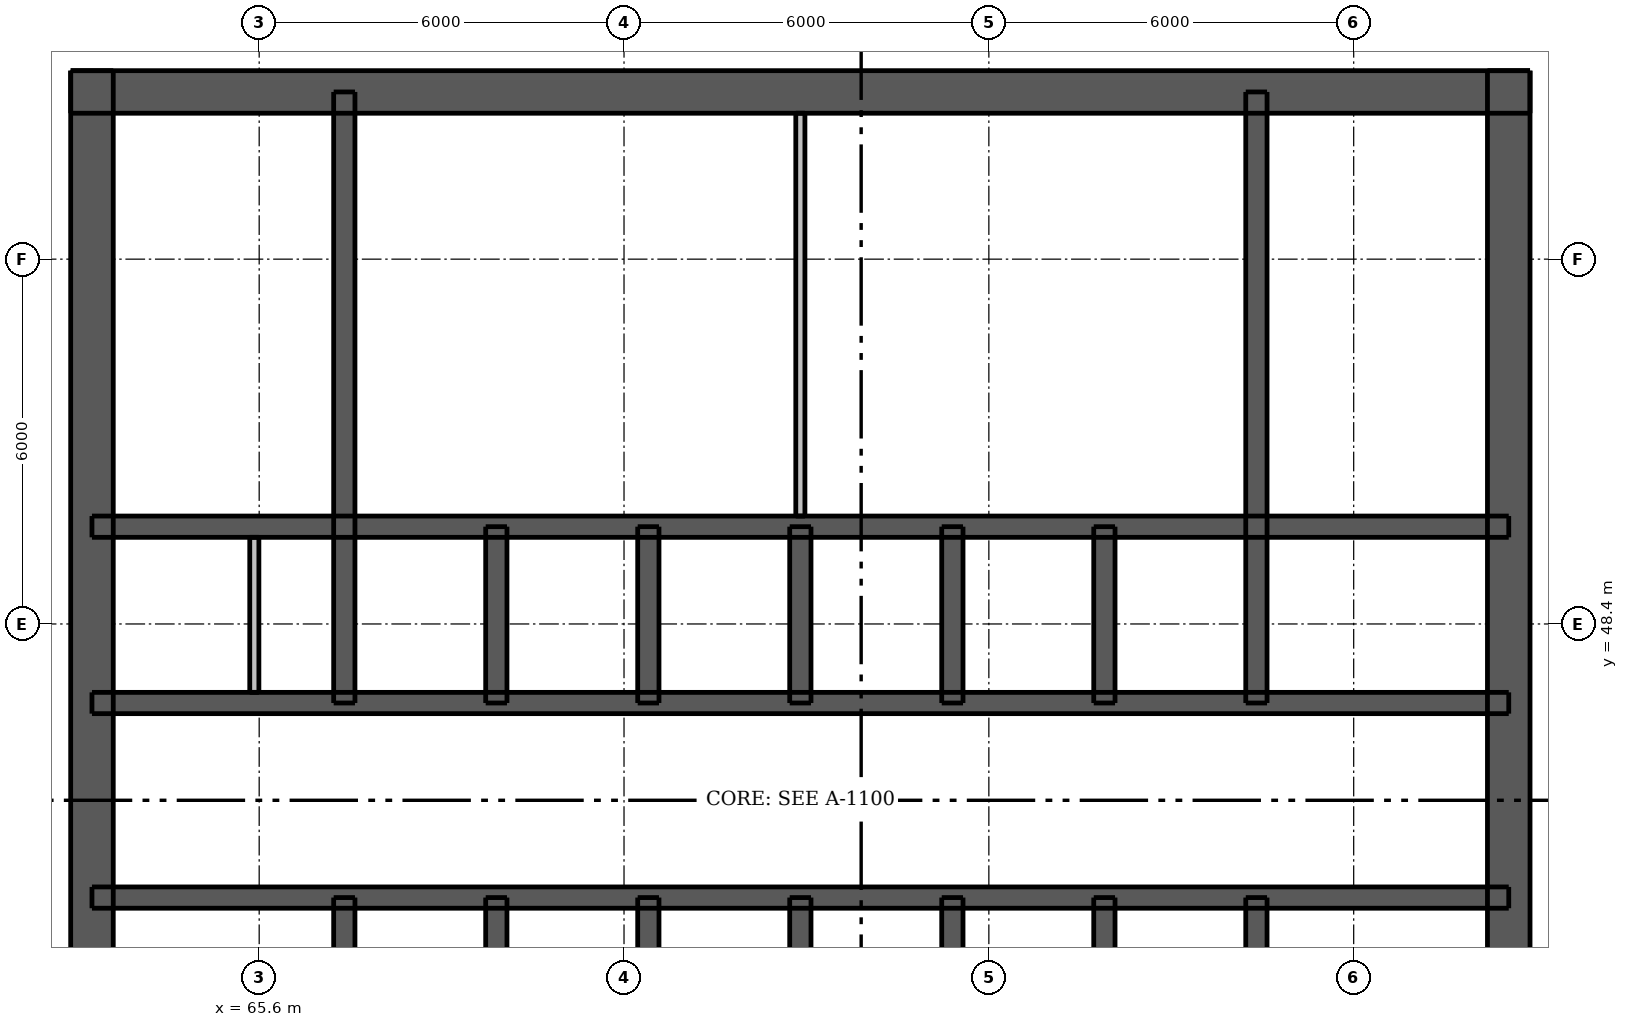
"""IFC4 building model, lengths in metres.
Left out: names, types, materials, properties, quantities, classifications, styles, units other than length and angle.
Written with IfcOpenShell. Run it as: python <this file> out.ifc"""

import sys

from ifc_helpers import new_model, si_unit, direction, frame, frame_2d, origin, place, context, subcontext, project, spatial, rectangle, extrude, element, fill, save


model = new_model("IFC4")
c1 = context("Model", 3, precision=1e-05, world=origin(), true_north=direction((0.0, 1.0)))
c2 = subcontext(c1, "Body", "Model", "MODEL_VIEW")
j1 = project(units=[si_unit("LENGTHUNIT", "METRE"), si_unit("PLANEANGLEUNIT", "RADIAN")], contexts=[c1])
p1 = place(None, origin())
s1 = spatial("IfcSite", under=j1, at=p1, CompositionType="ELEMENT")
p2 = place(p1, origin())
s2 = spatial("IfcBuilding", under=s1, at=p2, CompositionType="ELEMENT")
p3 = place(p2, frame((0.0, 0.0, 143.8)))
s3 = spatial("IfcBuildingStorey", under=s2, at=p3, CompositionType="ELEMENT", Elevation=143.8)
p4 = place(p3, frame((62.5, 57.15, 0.0), z_axis=(0.0, 0.0, 1.0), x_axis=(1.0, 0.0, 0.0)))
e1 = element("IfcWall", 1, at=p4, inside=s3, PredefinedType="SHEAR", context=c2, shape_type="SweptSolid", body=[
    extrude(rectangle(XDim=24.0, YDim=0.7, at=frame_2d((12.0, 0.0))), origin(), (0.0, 0.0, 1.0), 3.05),
])
p5 = place(p4, frame((20.938, 0.0, 0.0)))
e2 = element("IfcOpeningElement", 2, at=p5, cuts=e1, PredefinedType="OPENING", context=c2, shape_type="SweptSolid", body=[
    extrude(rectangle(XDim=1.1, YDim=2.1, at=frame_2d((0.55, 1.05))), frame((0.0, 0.36, 0.0), z_axis=(0.0, -1.0, 0.0), x_axis=(1.0, 0.0, 0.0)), (0.0, 0.0, 1.0), 0.72),
])
p6 = place(p4, frame((1.962, 0.0, 0.0)))
e3 = element("IfcOpeningElement", 3, at=p6, cuts=e1, PredefinedType="OPENING", context=c2, shape_type="SweptSolid", body=[
    extrude(rectangle(XDim=1.1, YDim=2.1, at=frame_2d((0.55, 1.05))), frame((0.0, 0.36, 0.0), z_axis=(0.0, -1.0, 0.0), x_axis=(1.0, 0.0, 0.0)), (0.0, 0.0, 1.0), 0.72),
])
p7 = place(p4, frame((7.887, 0.0, 0.0)))
e4 = element("IfcOpeningElement", 4, at=p7, cuts=e1, PredefinedType="OPENING", context=c2, shape_type="SweptSolid", body=[
    extrude(rectangle(XDim=0.9, YDim=2.1, at=frame_2d((0.45, 1.05))), frame((0.0, 0.36, 0.0), z_axis=(0.0, -1.0, 0.0), x_axis=(1.0, 0.0, 0.0)), (0.0, 0.0, 1.0), 0.72),
])
p8 = place(p4, frame((15.212, 0.0, 0.0)))
e5 = element("IfcOpeningElement", 5, at=p8, cuts=e1, PredefinedType="OPENING", context=c2, shape_type="SweptSolid", body=[
    extrude(rectangle(XDim=0.9, YDim=2.1, at=frame_2d((0.45, 1.05))), frame((0.0, 0.36, 0.0), z_axis=(0.0, -1.0, 0.0), x_axis=(1.0, 0.0, 0.0)), (0.0, 0.0, 1.0), 0.72),
])
p9 = place(p3, frame((62.85, 33.5, 0.0), z_axis=(0.0, 0.0, 1.0), x_axis=(0.0, 1.0, 0.0)))
e6 = element("IfcWall", 6, at=p9, inside=s3, PredefinedType="SHEAR", context=c2, shape_type="SweptSolid", body=[
    extrude(rectangle(XDim=24.0, YDim=0.7, at=frame_2d((12.0, 0.0))), origin(), (0.0, 0.0, 1.0), 3.05),
])
p10 = place(p9, frame((11.2, 0.0, 0.0)))
e7 = element("IfcOpeningElement", 7, at=p10, cuts=e6, PredefinedType="OPENING", context=c2, shape_type="SweptSolid", body=[
    extrude(rectangle(XDim=1.6, YDim=2.1, at=frame_2d((0.8, 1.05))), frame((0.0, 0.36, 0.0), z_axis=(0.0, -1.0, 0.0), x_axis=(1.0, 0.0, 0.0)), (0.0, 0.0, 1.0), 0.72),
])
p11 = place(p3, frame((86.15, 33.5, 0.0), z_axis=(0.0, 0.0, 1.0), x_axis=(0.0, 1.0, 0.0)))
e8 = element("IfcWall", 8, at=p11, inside=s3, PredefinedType="SHEAR", context=c2, shape_type="SweptSolid", body=[
    extrude(rectangle(XDim=24.0, YDim=0.7, at=frame_2d((12.0, 0.0))), origin(), (0.0, 0.0, 1.0), 3.05),
])
p12 = place(p11, frame((11.2, 0.0, 0.0)))
e9 = element("IfcOpeningElement", 9, at=p12, cuts=e8, PredefinedType="OPENING", context=c2, shape_type="SweptSolid", body=[
    extrude(rectangle(XDim=1.6, YDim=2.1, at=frame_2d((0.8, 1.05))), frame((0.0, 0.36, 0.0), z_axis=(0.0, -1.0, 0.0), x_axis=(1.0, 0.0, 0.0)), (0.0, 0.0, 1.0), 0.72),
])
p13 = place(p3, frame((62.85, 43.9, 0.0), z_axis=(0.0, 0.0, 1.0), x_axis=(1.0, 0.0, 0.0)))
e10 = element("IfcWall", 10, at=p13, inside=s3, PredefinedType="SHEAR", context=c2, shape_type="SweptSolid", body=[
    extrude(rectangle(XDim=23.3, YDim=0.35, at=frame_2d((11.65, 0.0))), origin(), (0.0, 0.0, 1.0), 3.05),
])
p14 = place(p13, frame((1.712, 0.0, 0.0)))
e11 = element("IfcOpeningElement", 11, at=p14, cuts=e10, PredefinedType="OPENING", context=c2, shape_type="SweptSolid", body=[
    extrude(rectangle(XDim=0.9, YDim=2.1, at=frame_2d((0.45, 1.05))), frame((0.0, 0.185, 0.0), z_axis=(0.0, -1.0, 0.0), x_axis=(1.0, 0.0, 0.0)), (0.0, 0.0, 1.0), 0.37),
])
p15 = place(p13, frame((20.688, 0.0, 0.0)))
e12 = element("IfcOpeningElement", 12, at=p15, cuts=e10, PredefinedType="OPENING", context=c2, shape_type="SweptSolid", body=[
    extrude(rectangle(XDim=0.9, YDim=2.1, at=frame_2d((0.45, 1.05))), frame((0.0, 0.185, 0.0), z_axis=(0.0, -1.0, 0.0), x_axis=(1.0, 0.0, 0.0)), (0.0, 0.0, 1.0), 0.37),
])
p16 = place(p13, frame((4.85, 0.0, 0.0)))
e13 = element("IfcOpeningElement", 13, at=p16, cuts=e10, PredefinedType="OPENING", context=c2, shape_type="SweptSolid", body=[
    extrude(rectangle(XDim=1.1, YDim=2.1, at=frame_2d((0.55, 1.05))), frame((0.0, 0.185, 0.0), z_axis=(0.0, -1.0, 0.0), x_axis=(1.0, 0.0, 0.0)), (0.0, 0.0, 1.0), 0.37),
])
p17 = place(p13, frame((7.35, 0.0, 0.0)))
e14 = element("IfcOpeningElement", 14, at=p17, cuts=e10, PredefinedType="OPENING", context=c2, shape_type="SweptSolid", body=[
    extrude(rectangle(XDim=1.1, YDim=2.1, at=frame_2d((0.55, 1.05))), frame((0.0, 0.185, 0.0), z_axis=(0.0, -1.0, 0.0), x_axis=(1.0, 0.0, 0.0)), (0.0, 0.0, 1.0), 0.37),
])
p18 = place(p13, frame((9.85, 0.0, 0.0)))
e15 = element("IfcOpeningElement", 15, at=p18, cuts=e10, PredefinedType="OPENING", context=c2, shape_type="SweptSolid", body=[
    extrude(rectangle(XDim=1.1, YDim=2.1, at=frame_2d((0.55, 1.05))), frame((0.0, 0.185, 0.0), z_axis=(0.0, -1.0, 0.0), x_axis=(1.0, 0.0, 0.0)), (0.0, 0.0, 1.0), 0.37),
])
p19 = place(p13, frame((12.35, 0.0, 0.0)))
e16 = element("IfcOpeningElement", 16, at=p19, cuts=e10, PredefinedType="OPENING", context=c2, shape_type="SweptSolid", body=[
    extrude(rectangle(XDim=1.1, YDim=2.1, at=frame_2d((0.55, 1.05))), frame((0.0, 0.185, 0.0), z_axis=(0.0, -1.0, 0.0), x_axis=(1.0, 0.0, 0.0)), (0.0, 0.0, 1.0), 0.37),
])
p20 = place(p13, frame((14.85, 0.0, 0.0)))
e17 = element("IfcOpeningElement", 17, at=p20, cuts=e10, PredefinedType="OPENING", context=c2, shape_type="SweptSolid", body=[
    extrude(rectangle(XDim=1.1, YDim=2.1, at=frame_2d((0.55, 1.05))), frame((0.0, 0.185, 0.0), z_axis=(0.0, -1.0, 0.0), x_axis=(1.0, 0.0, 0.0)), (0.0, 0.0, 1.0), 0.37),
])
p21 = place(p13, frame((17.35, 0.0, 0.0)))
e18 = element("IfcOpeningElement", 18, at=p21, cuts=e10, PredefinedType="OPENING", context=c2, shape_type="SweptSolid", body=[
    extrude(rectangle(XDim=1.1, YDim=2.1, at=frame_2d((0.55, 1.05))), frame((0.0, 0.185, 0.0), z_axis=(0.0, -1.0, 0.0), x_axis=(1.0, 0.0, 0.0)), (0.0, 0.0, 1.0), 0.37),
])
p22 = place(p3, frame((62.85, 47.1, 0.0), z_axis=(0.0, 0.0, 1.0), x_axis=(1.0, 0.0, 0.0)))
e19 = element("IfcWall", 19, at=p22, inside=s3, PredefinedType="SHEAR", context=c2, shape_type="SweptSolid", body=[
    extrude(rectangle(XDim=23.3, YDim=0.35, at=frame_2d((11.65, 0.0))), origin(), (0.0, 0.0, 1.0), 3.05),
])
p23 = place(p22, frame((1.06, 0.0, 0.0)))
e20 = element("IfcOpeningElement", 20, at=p23, cuts=e19, PredefinedType="OPENING", context=c2, shape_type="SweptSolid", body=[
    extrude(rectangle(XDim=0.9, YDim=2.1, at=frame_2d((0.45, 1.05))), frame((0.0, 0.185, 0.0), z_axis=(0.0, -1.0, 0.0), x_axis=(1.0, 0.0, 0.0)), (0.0, 0.0, 1.0), 0.37),
])
p24 = place(p22, frame((2.923, 0.0, 0.0)))
e21 = element("IfcOpeningElement", 21, at=p24, cuts=e19, PredefinedType="OPENING", context=c2, shape_type="SweptSolid", body=[
    extrude(rectangle(XDim=0.8, YDim=2.1, at=frame_2d((0.4, 1.05))), frame((0.0, 0.185, 0.0), z_axis=(0.0, -1.0, 0.0), x_axis=(1.0, 0.0, 0.0)), (0.0, 0.0, 1.0), 0.37),
])
p25 = place(p22, frame((20.688, 0.0, 0.0)))
e22 = element("IfcOpeningElement", 22, at=p25, cuts=e19, PredefinedType="OPENING", context=c2, shape_type="SweptSolid", body=[
    extrude(rectangle(XDim=0.9, YDim=2.1, at=frame_2d((0.45, 1.05))), frame((0.0, 0.185, 0.0), z_axis=(0.0, -1.0, 0.0), x_axis=(1.0, 0.0, 0.0)), (0.0, 0.0, 1.0), 0.37),
])
p26 = place(p3, frame((62.85, 50.0, 0.0), z_axis=(0.0, 0.0, 1.0), x_axis=(1.0, 0.0, 0.0)))
e23 = element("IfcWall", 23, at=p26, inside=s3, PredefinedType="SHEAR", context=c2, shape_type="SweptSolid", body=[
    extrude(rectangle(XDim=23.3, YDim=0.35, at=frame_2d((11.65, 0.0))), origin(), (0.0, 0.0, 1.0), 3.05),
])
p27 = place(p3, frame((67.0, 33.85, 0.0), z_axis=(0.0, 0.0, 1.0), x_axis=(0.0, 1.0, 0.0)))
e24 = element("IfcWall", 24, at=p27, inside=s3, PredefinedType="SHEAR", context=c2, shape_type="SweptSolid", body=[
    extrude(rectangle(XDim=10.05, YDim=0.35, at=frame_2d((5.025, 0.0))), origin(), (0.0, 0.0, 1.0), 3.05),
])
p28 = place(p27, frame((0.55, 0.0, 0.0)))
e25 = element("IfcOpeningElement", 25, at=p28, cuts=e24, PredefinedType="OPENING", context=c2, shape_type="SweptSolid", body=[
    extrude(rectangle(XDim=1.1, YDim=2.1, at=frame_2d((0.55, 1.05))), frame((0.0, 0.185, 0.0), z_axis=(0.0, -1.0, 0.0), x_axis=(1.0, 0.0, 0.0)), (0.0, 0.0, 1.0), 0.37),
])
for number, where, z_axis, x_axis in (
    (26, (67.0, 47.1, 0.0), (0.0, 0.0, 1.0), (0.0, 1.0, 0.0)),
    (27, (82.0, 33.85, 0.0), (0.0, 0.0, 1.0), (0.0, 1.0, 0.0)),
    (28, (82.0, 47.1, 0.0), (0.0, 0.0, 1.0), (0.0, 1.0, 0.0)),
):
    element("IfcWall", number, at=place(p3, frame(where, z_axis=z_axis, x_axis=x_axis)), inside=s3, PredefinedType="SHEAR", context=c2, shape_type="SweptSolid", body=[
        extrude(rectangle(XDim=10.05, YDim=0.35, at=frame_2d((5.025, 0.0))), origin(), (0.0, 0.0, 1.0), 3.05),
    ])
for number, where, z_axis, x_axis in (
    (29, (69.5, 41.0, 0.0), (0.0, 0.0, 1.0), (0.0, 1.0, 0.0)),
    (30, (69.5, 47.1, 0.0), (0.0, 0.0, 1.0), (0.0, 1.0, 0.0)),
    (31, (72.0, 41.0, 0.0), (0.0, 0.0, 1.0), (0.0, 1.0, 0.0)),
    (32, (72.0, 47.1, 0.0), (0.0, 0.0, 1.0), (0.0, 1.0, 0.0)),
    (33, (74.5, 41.0, 0.0), (0.0, 0.0, 1.0), (0.0, 1.0, 0.0)),
    (34, (74.5, 47.1, 0.0), (0.0, 0.0, 1.0), (0.0, 1.0, 0.0)),
    (35, (77.0, 41.0, 0.0), (0.0, 0.0, 1.0), (0.0, 1.0, 0.0)),
    (36, (77.0, 47.1, 0.0), (0.0, 0.0, 1.0), (0.0, 1.0, 0.0)),
    (37, (79.5, 41.0, 0.0), (0.0, 0.0, 1.0), (0.0, 1.0, 0.0)),
    (38, (79.5, 47.1, 0.0), (0.0, 0.0, 1.0), (0.0, 1.0, 0.0)),
):
    element("IfcWall", number, at=place(p3, frame(where, z_axis=z_axis, x_axis=x_axis)), inside=s3, PredefinedType="SHEAR", context=c2, shape_type="SweptSolid", body=[
        extrude(rectangle(XDim=2.9, YDim=0.35, at=frame_2d((1.45, 0.0))), origin(), (0.0, 0.0, 1.0), 3.05),
    ])
p29 = place(p3, frame((65.52, 47.275, 0.0), z_axis=(0.0, 0.0, 1.0), x_axis=(0.0, 1.0, 0.0)))
e39 = element("IfcWall", 39, at=p29, inside=s3, PredefinedType="PLUMBINGWALL", context=c2, shape_type="SweptSolid", body=[
    extrude(rectangle(XDim=2.55, YDim=0.15, at=frame_2d((1.275, 0.0))), origin(), (0.0, 0.0, 1.0), 3.05),
])
p30 = place(p3, frame((74.5, 50.175, 0.0), z_axis=(0.0, 0.0, 1.0), x_axis=(0.0, 1.0, 0.0)))
e40 = element("IfcWall", 40, at=p30, inside=s3, PredefinedType="PLUMBINGWALL", context=c2, shape_type="SweptSolid", body=[
    extrude(rectangle(XDim=6.625, YDim=0.15, at=frame_2d((3.312, 0.0))), origin(), (0.0, 0.0, 1.0), 3.05),
])
p31 = place(p5, origin())
e41 = element("IfcDoor", 41, at=p31, inside=s3, OperationType="SINGLE_SWING_RIGHT", PredefinedType="DOOR", context=c2, shape_type="SweptSolid", body=[
    extrude(rectangle(XDim=1.1, YDim=2.1, at=frame_2d((0.55, 1.05))), frame((0.0, -0.288, 0.0), z_axis=(0.0, -1.0, 0.0), x_axis=(1.0, 0.0, 0.0)), (0.0, 0.0, 1.0), 0.05),
])
fill(e2, e41)
p32 = place(p6, origin())
e42 = element("IfcDoor", 42, at=p32, inside=s3, OperationType="SINGLE_SWING_LEFT", PredefinedType="DOOR", context=c2, shape_type="SweptSolid", body=[
    extrude(rectangle(XDim=1.1, YDim=2.1, at=frame_2d((0.55, 1.05))), frame((0.0, -0.288, 0.0), z_axis=(0.0, -1.0, 0.0), x_axis=(1.0, 0.0, 0.0)), (0.0, 0.0, 1.0), 0.05),
])
fill(e3, e42)
p33 = place(p10, origin())
e43 = element("IfcDoor", 43, at=p33, inside=s3, OperationType="DOUBLE_DOOR_SINGLE_SWING", PredefinedType="DOOR", context=c2, shape_type="SweptSolid", body=[
    extrude(rectangle(XDim=1.6, YDim=2.1, at=frame_2d((0.8, 1.05))), frame((0.0, -0.288, 0.0), z_axis=(0.0, -1.0, 0.0), x_axis=(1.0, 0.0, 0.0)), (0.0, 0.0, 1.0), 0.05),
])
fill(e7, e43)
p34 = place(p12, origin())
e44 = element("IfcDoor", 44, at=p34, inside=s3, OperationType="DOUBLE_DOOR_SINGLE_SWING", PredefinedType="DOOR", context=c2, shape_type="SweptSolid", body=[
    extrude(rectangle(XDim=1.6, YDim=2.1, at=frame_2d((0.8, 1.05))), frame((0.0, 0.337, 0.0), z_axis=(0.0, -1.0, 0.0), x_axis=(1.0, 0.0, 0.0)), (0.0, 0.0, 1.0), 0.05),
])
fill(e9, e44)
p35 = place(p14, origin())
e45 = element("IfcDoor", 45, at=p35, inside=s3, OperationType="SINGLE_SWING_LEFT", PredefinedType="DOOR", context=c2, shape_type="SweptSolid", body=[
    extrude(rectangle(XDim=0.9, YDim=2.1, at=frame_2d((0.45, 1.05))), frame((0.0, -0.112, 0.0), z_axis=(0.0, -1.0, 0.0), x_axis=(1.0, 0.0, 0.0)), (0.0, 0.0, 1.0), 0.05),
])
fill(e11, e45)
p36 = place(p15, origin())
e46 = element("IfcDoor", 46, at=p36, inside=s3, OperationType="SINGLE_SWING_LEFT", PredefinedType="DOOR", context=c2, shape_type="SweptSolid", body=[
    extrude(rectangle(XDim=0.9, YDim=2.1, at=frame_2d((0.45, 1.05))), frame((0.0, -0.112, 0.0), z_axis=(0.0, -1.0, 0.0), x_axis=(1.0, 0.0, 0.0)), (0.0, 0.0, 1.0), 0.05),
])
fill(e12, e46)
p37 = place(p23, origin())
e47 = element("IfcDoor", 47, at=p37, inside=s3, OperationType="SINGLE_SWING_LEFT", PredefinedType="DOOR", context=c2, shape_type="SweptSolid", body=[
    extrude(rectangle(XDim=0.9, YDim=2.1, at=frame_2d((0.45, 1.05))), frame((0.0, 0.163, 0.0), z_axis=(0.0, -1.0, 0.0), x_axis=(1.0, 0.0, 0.0)), (0.0, 0.0, 1.0), 0.05),
])
fill(e20, e47)
p38 = place(p24, origin())
e48 = element("IfcDoor", 48, at=p38, inside=s3, OperationType="SINGLE_SWING_RIGHT", PredefinedType="DOOR", context=c2, shape_type="SweptSolid", body=[
    extrude(rectangle(XDim=0.8, YDim=2.1, at=frame_2d((0.4, 1.05))), frame((0.0, 0.163, 0.0), z_axis=(0.0, -1.0, 0.0), x_axis=(1.0, 0.0, 0.0)), (0.0, 0.0, 1.0), 0.05),
])
fill(e21, e48)
p39 = place(p25, origin())
e49 = element("IfcDoor", 49, at=p39, inside=s3, OperationType="SINGLE_SWING_LEFT", PredefinedType="DOOR", context=c2, shape_type="SweptSolid", body=[
    extrude(rectangle(XDim=0.9, YDim=2.1, at=frame_2d((0.45, 1.05))), frame((0.0, 0.163, 0.0), z_axis=(0.0, -1.0, 0.0), x_axis=(1.0, 0.0, 0.0)), (0.0, 0.0, 1.0), 0.05),
])
fill(e22, e49)
p40 = place(p7, origin())
e50 = element("IfcDoor", 50, at=p40, inside=s3, OperationType="SINGLE_SWING_RIGHT", PredefinedType="DOOR", context=c2, shape_type="SweptSolid", body=[
    extrude(rectangle(XDim=0.9, YDim=2.1, at=frame_2d((0.45, 1.05))), frame((0.0, -0.288, 0.0), z_axis=(0.0, -1.0, 0.0), x_axis=(1.0, 0.0, 0.0)), (0.0, 0.0, 1.0), 0.05),
])
fill(e4, e50)
p41 = place(p8, origin())
e51 = element("IfcDoor", 51, at=p41, inside=s3, OperationType="SINGLE_SWING_RIGHT", PredefinedType="DOOR", context=c2, shape_type="SweptSolid", body=[
    extrude(rectangle(XDim=0.9, YDim=2.1, at=frame_2d((0.45, 1.05))), frame((0.0, -0.288, 0.0), z_axis=(0.0, -1.0, 0.0), x_axis=(1.0, 0.0, 0.0)), (0.0, 0.0, 1.0), 0.05),
])
fill(e5, e51)
p42 = place(p16, origin())
e52 = element("IfcDoor", 52, at=p42, inside=s3, OperationType="DOUBLE_DOOR_SLIDING", PredefinedType="DOOR", context=c2, shape_type="SweptSolid", body=[
    extrude(rectangle(XDim=1.1, YDim=2.1, at=frame_2d((0.55, 1.05))), frame((0.0, 0.025, 0.0), z_axis=(0.0, -1.0, 0.0), x_axis=(1.0, 0.0, 0.0)), (0.0, 0.0, 1.0), 0.05),
])
fill(e13, e52)
p43 = place(p17, origin())
e53 = element("IfcDoor", 53, at=p43, inside=s3, OperationType="DOUBLE_DOOR_SLIDING", PredefinedType="DOOR", context=c2, shape_type="SweptSolid", body=[
    extrude(rectangle(XDim=1.1, YDim=2.1, at=frame_2d((0.55, 1.05))), frame((0.0, 0.025, 0.0), z_axis=(0.0, -1.0, 0.0), x_axis=(1.0, 0.0, 0.0)), (0.0, 0.0, 1.0), 0.05),
])
fill(e14, e53)
p44 = place(p18, origin())
e54 = element("IfcDoor", 54, at=p44, inside=s3, OperationType="DOUBLE_DOOR_SLIDING", PredefinedType="DOOR", context=c2, shape_type="SweptSolid", body=[
    extrude(rectangle(XDim=1.1, YDim=2.1, at=frame_2d((0.55, 1.05))), frame((0.0, 0.025, 0.0), z_axis=(0.0, -1.0, 0.0), x_axis=(1.0, 0.0, 0.0)), (0.0, 0.0, 1.0), 0.05),
])
fill(e15, e54)
p45 = place(p19, origin())
e55 = element("IfcDoor", 55, at=p45, inside=s3, OperationType="DOUBLE_DOOR_SLIDING", PredefinedType="DOOR", context=c2, shape_type="SweptSolid", body=[
    extrude(rectangle(XDim=1.1, YDim=2.1, at=frame_2d((0.55, 1.05))), frame((0.0, 0.025, 0.0), z_axis=(0.0, -1.0, 0.0), x_axis=(1.0, 0.0, 0.0)), (0.0, 0.0, 1.0), 0.05),
])
fill(e16, e55)
p46 = place(p20, origin())
e56 = element("IfcDoor", 56, at=p46, inside=s3, OperationType="DOUBLE_DOOR_SLIDING", PredefinedType="DOOR", context=c2, shape_type="SweptSolid", body=[
    extrude(rectangle(XDim=1.1, YDim=2.1, at=frame_2d((0.55, 1.05))), frame((0.0, 0.025, 0.0), z_axis=(0.0, -1.0, 0.0), x_axis=(1.0, 0.0, 0.0)), (0.0, 0.0, 1.0), 0.05),
])
fill(e17, e56)
p47 = place(p21, origin())
e57 = element("IfcDoor", 57, at=p47, inside=s3, OperationType="DOUBLE_DOOR_SLIDING", PredefinedType="DOOR", context=c2, shape_type="SweptSolid", body=[
    extrude(rectangle(XDim=1.1, YDim=2.1, at=frame_2d((0.55, 1.05))), frame((0.0, 0.025, 0.0), z_axis=(0.0, -1.0, 0.0), x_axis=(1.0, 0.0, 0.0)), (0.0, 0.0, 1.0), 0.05),
])
fill(e18, e57)
save(model, sys.argv[1])
